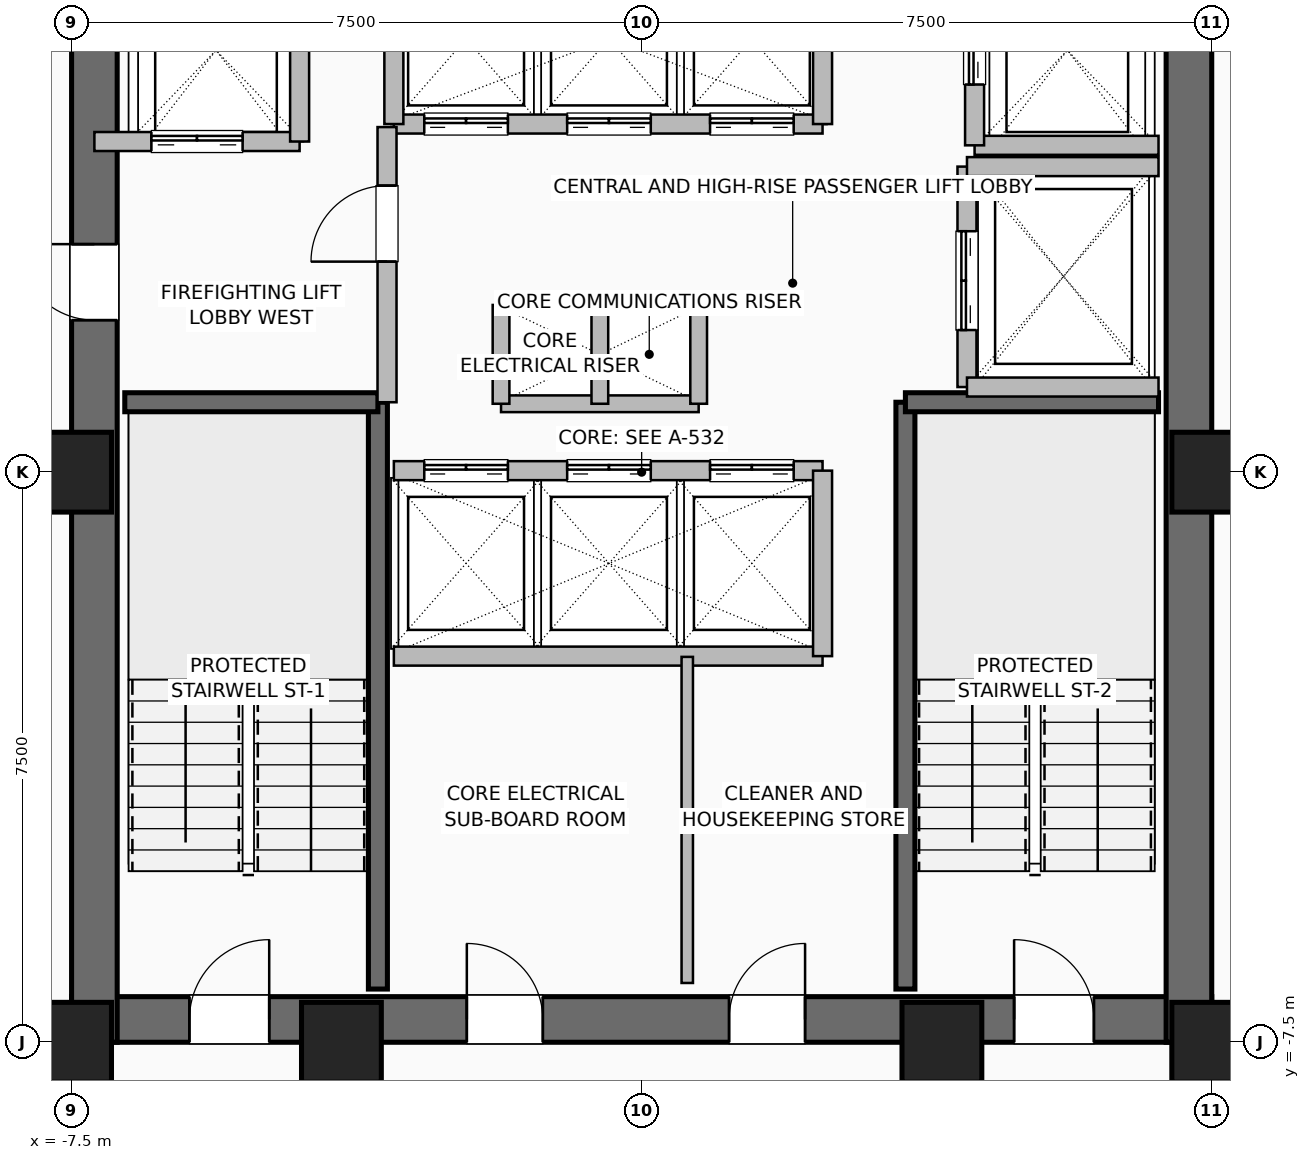
"""IFC4 building model, lengths in metres.
Left out: names, types, materials, properties, quantities, classifications, styles, units other than length and angle.
Written with IfcOpenShell. Run it as: python <this file> out.ifc"""

import sys

from ifc_helpers import new_model, si_unit, direction, frame, frame_2d, origin, origin_2d, place, context, subcontext, project, spatial, rectangle, hollow_rectangle, extrude, element, fill, save


model = new_model("IFC4")
c1 = context("Model", 3, precision=1e-05, world=origin(), true_north=direction((0.0, 1.0)))
c2 = subcontext(c1, "Body", "Model", "MODEL_VIEW")
j1 = project(units=[si_unit("LENGTHUNIT", "METRE"), si_unit("PLANEANGLEUNIT", "RADIAN")], contexts=[c1])
p1 = place(None, origin())
s1 = spatial("IfcSite", under=j1, at=p1, CompositionType="ELEMENT")
p2 = place(p1, origin())
s2 = spatial("IfcBuilding", under=s1, at=p2, CompositionType="ELEMENT")
p3 = place(p2, frame((0.0, 0.0, 122.8)))
s3 = spatial("IfcBuildingStorey", under=s2, at=p3, CompositionType="ELEMENT", Elevation=122.8)
for number, where, z_axis, x_axis in (
    (1, (-7.5, -7.5, 0.0), (0.0, 0.0, 1.0), (1.0, 0.0, 0.0)),
    (2, (-3.95, -7.5, 0.0), (0.0, 0.0, 1.0), (1.0, 0.0, 0.0)),
    (3, (3.95, -7.5, 0.0), (0.0, 0.0, 1.0), (1.0, 0.0, 0.0)),
    (4, (7.5, -7.5, 0.0), (0.0, 0.0, 1.0), (1.0, 0.0, 0.0)),
    (5, (7.5, 0.0, 0.0), (0.0, 0.0, 1.0), (1.0, 0.0, 0.0)),
    (6, (-7.5, 0.0, 0.0), (0.0, 0.0, 1.0), (1.0, 0.0, 0.0)),
):
    element("IfcColumn", number, at=place(p3, frame(where, z_axis=z_axis, x_axis=x_axis)), inside=s3, PredefinedType="COLUMN", context=c2, shape_type="SweptSolid", body=[
        extrude(hollow_rectangle(XDim=1.05, YDim=1.05, WallThickness=0.05, at=origin_2d()), origin(), (0.0, 0.0, 1.0), 3.6),
    ])
p4 = place(p3, frame((-7.5, -7.2, 0.0), z_axis=(0.0, 0.0, 1.0), x_axis=(1.0, 0.0, 0.0)))
e7 = element("IfcWall", 7, at=p4, inside=s3, PredefinedType="SHEAR", context=c2, shape_type="SweptSolid", body=[
    extrude(rectangle(XDim=15.0, YDim=0.6, at=frame_2d((7.5, 0.0))), origin(), (0.0, 0.0, 1.0), 3.36),
])
p5 = place(p4, frame((1.55, 0.0, 0.0)))
e8 = element("IfcOpeningElement", 8, at=p5, cuts=e7, PredefinedType="OPENING", context=c2, shape_type="SweptSolid", body=[
    extrude(rectangle(XDim=1.05, YDim=2.08, at=frame_2d((0.525, 1.04))), frame((0.0, 0.31, 0.0), z_axis=(0.0, -1.0, 0.0), x_axis=(1.0, 0.0, 0.0)), (0.0, 0.0, 1.0), 0.62),
])
p6 = place(p4, frame((12.4, 0.0, 0.0)))
e9 = element("IfcOpeningElement", 9, at=p6, cuts=e7, PredefinedType="OPENING", context=c2, shape_type="SweptSolid", body=[
    extrude(rectangle(XDim=1.05, YDim=2.08, at=frame_2d((0.525, 1.04))), frame((0.0, 0.31, 0.0), z_axis=(0.0, -1.0, 0.0), x_axis=(1.0, 0.0, 0.0)), (0.0, 0.0, 1.0), 0.62),
])
p7 = place(p4, frame((5.2, 0.0, 0.0)))
e10 = element("IfcOpeningElement", 10, at=p7, cuts=e7, PredefinedType="OPENING", context=c2, shape_type="SweptSolid", body=[
    extrude(rectangle(XDim=1.0, YDim=2.08, at=frame_2d((0.5, 1.04))), frame((0.0, 0.31, 0.0), z_axis=(0.0, -1.0, 0.0), x_axis=(1.0, 0.0, 0.0)), (0.0, 0.0, 1.0), 0.62),
])
p8 = place(p4, frame((8.65, 0.0, 0.0)))
e11 = element("IfcOpeningElement", 11, at=p8, cuts=e7, PredefinedType="OPENING", context=c2, shape_type="SweptSolid", body=[
    extrude(rectangle(XDim=1.0, YDim=2.08, at=frame_2d((0.5, 1.04))), frame((0.0, 0.31, 0.0), z_axis=(0.0, -1.0, 0.0), x_axis=(1.0, 0.0, 0.0)), (0.0, 0.0, 1.0), 0.62),
])
p9 = place(p3, frame((-7.2, -7.5, 0.0), z_axis=(0.0, 0.0, 1.0), x_axis=(0.0, 1.0, 0.0)))
e12 = element("IfcWall", 12, at=p9, inside=s3, PredefinedType="SHEAR", context=c2, shape_type="SweptSolid", body=[
    extrude(rectangle(XDim=15.0, YDim=0.6, at=frame_2d((7.5, 0.0))), origin(), (0.0, 0.0, 1.0), 3.36),
])
p10 = place(p9, frame((9.5, 0.0, 0.0)))
e13 = element("IfcOpeningElement", 13, at=p10, cuts=e12, PredefinedType="OPENING", context=c2, shape_type="SweptSolid", body=[
    extrude(rectangle(XDim=1.0, YDim=2.08, at=frame_2d((0.5, 1.04))), frame((0.0, 0.31, 0.0), z_axis=(0.0, -1.0, 0.0), x_axis=(1.0, 0.0, 0.0)), (0.0, 0.0, 1.0), 0.62),
])
p11 = place(p3, frame((7.2, -7.5, 0.0), z_axis=(0.0, 0.0, 1.0), x_axis=(0.0, 1.0, 0.0)))
e14 = element("IfcWall", 14, at=p11, inside=s3, PredefinedType="SHEAR", context=c2, shape_type="SweptSolid", body=[
    extrude(rectangle(XDim=15.0, YDim=0.6, at=frame_2d((7.5, 0.0))), origin(), (0.0, 0.0, 1.0), 3.36),
])
p12 = place(p3, frame((-3.47, -6.8, 0.0), z_axis=(0.0, 0.0, 1.0), x_axis=(0.0, 1.0, 0.0)))
e15 = element("IfcWall", 15, at=p12, inside=s3, PredefinedType="SHEAR", context=c2, shape_type="SweptSolid", body=[
    extrude(rectangle(XDim=7.72, YDim=0.25, at=frame_2d((3.86, 0.0))), origin(), (0.0, 0.0, 1.0), 3.36),
])
p13 = place(p3, frame((-6.8, 0.92, 0.0), z_axis=(0.0, 0.0, 1.0), x_axis=(1.0, 0.0, 0.0)))
e16 = element("IfcWall", 16, at=p13, inside=s3, PredefinedType="SHEAR", context=c2, shape_type="SweptSolid", body=[
    extrude(rectangle(XDim=3.33, YDim=0.25, at=frame_2d((1.665, 0.0))), origin(), (0.0, 0.0, 1.0), 3.36),
])
p14 = place(p3, frame((3.47, -6.8, 0.0), z_axis=(0.0, 0.0, 1.0), x_axis=(0.0, 1.0, 0.0)))
e17 = element("IfcWall", 17, at=p14, inside=s3, PredefinedType="SHEAR", context=c2, shape_type="SweptSolid", body=[
    extrude(rectangle(XDim=7.72, YDim=0.25, at=frame_2d((3.86, 0.0))), origin(), (0.0, 0.0, 1.0), 3.36),
])
p15 = place(p3, frame((3.47, 0.92, 0.0), z_axis=(0.0, 0.0, 1.0), x_axis=(1.0, 0.0, 0.0)))
e18 = element("IfcWall", 18, at=p15, inside=s3, PredefinedType="SHEAR", context=c2, shape_type="SweptSolid", body=[
    extrude(rectangle(XDim=3.33, YDim=0.25, at=frame_2d((1.665, 0.0))), origin(), (0.0, 0.0, 1.0), 3.36),
])
for number, where, z_axis, x_axis in (
    (19, (-1.85, 2.2, 0.0), (0.0, 0.0, 1.0), (1.0, 0.0, 0.0)),
    (20, (-1.85, 0.9, 0.0), (0.0, 0.0, 1.0), (1.0, 0.0, 0.0)),
):
    element("IfcWall", number, at=place(p3, frame(where, z_axis=z_axis, x_axis=x_axis)), inside=s3, PredefinedType="PARTITIONING", context=c2, shape_type="SweptSolid", body=[
        extrude(rectangle(XDim=2.6, YDim=0.22, at=frame_2d((1.3, 0.0))), origin(), (0.0, 0.0, 1.0), 3.36),
    ])
for number, where, z_axis, x_axis in (
    (21, (-0.55, 0.9, 0.0), (0.0, 0.0, 1.0), (0.0, 1.0, 0.0)),
    (22, (0.75, 0.9, 0.0), (0.0, 0.0, 1.0), (0.0, 1.0, 0.0)),
    (23, (-1.85, 0.9, 0.0), (0.0, 0.0, 1.0), (0.0, 1.0, 0.0)),
):
    element("IfcWall", number, at=place(p3, frame(where, z_axis=z_axis, x_axis=x_axis)), inside=s3, PredefinedType="PARTITIONING", context=c2, shape_type="SweptSolid", body=[
        extrude(rectangle(XDim=1.3, YDim=0.22, at=frame_2d((0.65, 0.0))), origin(), (0.0, 0.0, 1.0), 3.36),
    ])
p16 = place(p3, frame((-3.26, 0.02, 0.0), z_axis=(0.0, 0.0, 1.0), x_axis=(1.0, 0.0, 0.0)))
e24 = element("IfcWall", 24, at=p16, inside=s3, PredefinedType="SHEAR", context=c2, shape_type="SweptSolid", body=[
    extrude(rectangle(XDim=5.64, YDim=0.25, at=frame_2d((2.82, 0.0))), origin(), (0.0, 0.0, 1.0), 3.36),
])
p17 = place(p16, frame((0.4, 0.0, 0.0)))
e25 = element("IfcOpeningElement", 25, at=p17, cuts=e24, PredefinedType="OPENING", context=c2, shape_type="SweptSolid", body=[
    extrude(rectangle(XDim=1.1, YDim=2.2, at=frame_2d((0.55, 1.1))), frame((0.0, 0.135, 0.0), z_axis=(0.0, -1.0, 0.0), x_axis=(1.0, 0.0, 0.0)), (0.0, 0.0, 1.0), 0.27),
])
p18 = place(p16, frame((2.28, 0.0, 0.0)))
e26 = element("IfcOpeningElement", 26, at=p18, cuts=e24, PredefinedType="OPENING", context=c2, shape_type="SweptSolid", body=[
    extrude(rectangle(XDim=1.1, YDim=2.2, at=frame_2d((0.55, 1.1))), frame((0.0, 0.135, 0.0), z_axis=(0.0, -1.0, 0.0), x_axis=(1.0, 0.0, 0.0)), (0.0, 0.0, 1.0), 0.27),
])
p19 = place(p16, frame((4.16, 0.0, 0.0)))
e27 = element("IfcOpeningElement", 27, at=p19, cuts=e24, PredefinedType="OPENING", context=c2, shape_type="SweptSolid", body=[
    extrude(rectangle(XDim=1.1, YDim=2.2, at=frame_2d((0.55, 1.1))), frame((0.0, 0.135, 0.0), z_axis=(0.0, -1.0, 0.0), x_axis=(1.0, 0.0, 0.0)), (0.0, 0.0, 1.0), 0.27),
])
p20 = place(p3, frame((-3.26, -2.42, 0.0), z_axis=(0.0, 0.0, 1.0), x_axis=(1.0, 0.0, 0.0)))
e28 = element("IfcWall", 28, at=p20, inside=s3, PredefinedType="SHEAR", context=c2, shape_type="SweptSolid", body=[
    extrude(rectangle(XDim=5.64, YDim=0.25, at=frame_2d((2.82, 0.0))), origin(), (0.0, 0.0, 1.0), 3.36),
])
p21 = place(p3, frame((2.38, -2.42, 0.0), z_axis=(0.0, 0.0, 1.0), x_axis=(0.0, 1.0, 0.0)))
e29 = element("IfcWall", 29, at=p21, inside=s3, PredefinedType="SHEAR", context=c2, shape_type="SweptSolid", body=[
    extrude(rectangle(XDim=2.44, YDim=0.25, at=frame_2d((1.22, 0.0))), origin(), (0.0, 0.0, 1.0), 3.36),
])
p22 = place(p3, frame((-3.26, 4.58, 0.0), z_axis=(0.0, 0.0, 1.0), x_axis=(1.0, 0.0, 0.0)))
e30 = element("IfcWall", 30, at=p22, inside=s3, PredefinedType="SHEAR", context=c2, shape_type="SweptSolid", body=[
    extrude(rectangle(XDim=5.64, YDim=0.25, at=frame_2d((2.82, 0.0))), origin(), (0.0, 0.0, 1.0), 3.36),
])
p23 = place(p22, frame((0.4, 0.0, 0.0)))
e31 = element("IfcOpeningElement", 31, at=p23, cuts=e30, PredefinedType="OPENING", context=c2, shape_type="SweptSolid", body=[
    extrude(rectangle(XDim=1.1, YDim=2.2, at=frame_2d((0.55, 1.1))), frame((0.0, 0.135, 0.0), z_axis=(0.0, -1.0, 0.0), x_axis=(1.0, 0.0, 0.0)), (0.0, 0.0, 1.0), 0.27),
])
p24 = place(p22, frame((2.28, 0.0, 0.0)))
e32 = element("IfcOpeningElement", 32, at=p24, cuts=e30, PredefinedType="OPENING", context=c2, shape_type="SweptSolid", body=[
    extrude(rectangle(XDim=1.1, YDim=2.2, at=frame_2d((0.55, 1.1))), frame((0.0, 0.135, 0.0), z_axis=(0.0, -1.0, 0.0), x_axis=(1.0, 0.0, 0.0)), (0.0, 0.0, 1.0), 0.27),
])
p25 = place(p22, frame((4.16, 0.0, 0.0)))
e33 = element("IfcOpeningElement", 33, at=p25, cuts=e30, PredefinedType="OPENING", context=c2, shape_type="SweptSolid", body=[
    extrude(rectangle(XDim=1.1, YDim=2.2, at=frame_2d((0.55, 1.1))), frame((0.0, 0.135, 0.0), z_axis=(0.0, -1.0, 0.0), x_axis=(1.0, 0.0, 0.0)), (0.0, 0.0, 1.0), 0.27),
])
for number, where, z_axis, x_axis in (
    (34, (-3.26, 4.58, 0.0), (0.0, 0.0, 1.0), (0.0, 1.0, 0.0)),
    (35, (2.38, 4.58, 0.0), (0.0, 0.0, 1.0), (0.0, 1.0, 0.0)),
):
    element("IfcWall", number, at=place(p3, frame(where, z_axis=z_axis, x_axis=x_axis)), inside=s3, PredefinedType="SHEAR", context=c2, shape_type="SweptSolid", body=[
        extrude(rectangle(XDim=2.22, YDim=0.25, at=frame_2d((1.11, 0.0))), origin(), (0.0, 0.0, 1.0), 3.36),
    ])
p26 = place(p3, frame((-7.2, 4.35, 0.0), z_axis=(0.0, 0.0, 1.0), x_axis=(1.0, 0.0, 0.0)))
e36 = element("IfcWall", 36, at=p26, inside=s3, PredefinedType="SHEAR", context=c2, shape_type="SweptSolid", body=[
    extrude(rectangle(XDim=2.7, YDim=0.25, at=frame_2d((1.35, 0.0))), origin(), (0.0, 0.0, 1.0), 3.36),
])
p27 = place(p26, frame((0.75, 0.0, 0.0)))
e37 = element("IfcOpeningElement", 37, at=p27, cuts=e36, PredefinedType="OPENING", context=c2, shape_type="SweptSolid", body=[
    extrude(rectangle(XDim=1.2, YDim=2.2, at=frame_2d((0.6, 1.1))), frame((0.0, 0.135, 0.0), z_axis=(0.0, -1.0, 0.0), x_axis=(1.0, 0.0, 0.0)), (0.0, 0.0, 1.0), 0.27),
])
p28 = place(p3, frame((-4.5, 4.35, 0.0), z_axis=(0.0, 0.0, 1.0), x_axis=(0.0, 1.0, 0.0)))
e38 = element("IfcWall", 38, at=p28, inside=s3, PredefinedType="SHEAR", context=c2, shape_type="SweptSolid", body=[
    extrude(rectangle(XDim=2.85, YDim=0.25, at=frame_2d((1.425, 0.0))), origin(), (0.0, 0.0, 1.0), 3.36),
])
p29 = place(p3, frame((4.38, 4.3, 0.0), z_axis=(0.0, 0.0, 1.0), x_axis=(1.0, 0.0, 0.0)))
e39 = element("IfcWall", 39, at=p29, inside=s3, PredefinedType="SHEAR", context=c2, shape_type="SweptSolid", body=[
    extrude(rectangle(XDim=2.42, YDim=0.25, at=frame_2d((1.21, 0.0))), origin(), (0.0, 0.0, 1.0), 3.36),
])
p30 = place(p3, frame((4.38, 4.3, 0.0), z_axis=(0.0, 0.0, 1.0), x_axis=(0.0, 1.0, 0.0)))
e40 = element("IfcWall", 40, at=p30, inside=s3, PredefinedType="SHEAR", context=c2, shape_type="SweptSolid", body=[
    extrude(rectangle(XDim=2.5, YDim=0.25, at=frame_2d((1.25, 0.0))), origin(), (0.0, 0.0, 1.0), 3.36),
])
p31 = place(p30, frame((0.8, 0.0, 0.0)))
e41 = element("IfcOpeningElement", 41, at=p31, cuts=e40, PredefinedType="OPENING", context=c2, shape_type="SweptSolid", body=[
    extrude(rectangle(XDim=1.2, YDim=2.2, at=frame_2d((0.6, 1.1))), frame((0.0, 0.135, 0.0), z_axis=(0.0, -1.0, 0.0), x_axis=(1.0, 0.0, 0.0)), (0.0, 0.0, 1.0), 0.27),
])
p32 = place(p3, frame((4.28, 1.12, 0.0), z_axis=(0.0, 0.0, 1.0), x_axis=(0.0, 1.0, 0.0)))
e42 = element("IfcWall", 42, at=p32, inside=s3, PredefinedType="SHEAR", context=c2, shape_type="SweptSolid", body=[
    extrude(rectangle(XDim=2.9, YDim=0.25, at=frame_2d((1.45, 0.0))), origin(), (0.0, 0.0, 1.0), 3.36),
])
p33 = place(p32, frame((0.75, 0.0, 0.0)))
e43 = element("IfcOpeningElement", 43, at=p33, cuts=e42, PredefinedType="OPENING", context=c2, shape_type="SweptSolid", body=[
    extrude(rectangle(XDim=1.3, YDim=2.3, at=frame_2d((0.65, 1.15))), frame((0.0, 0.135, 0.0), z_axis=(0.0, -1.0, 0.0), x_axis=(1.0, 0.0, 0.0)), (0.0, 0.0, 1.0), 0.27),
])
for number, where, z_axis, x_axis in (
    (44, (4.28, 1.12, 0.0), (0.0, 0.0, 1.0), (1.0, 0.0, 0.0)),
    (45, (4.28, 4.02, 0.0), (0.0, 0.0, 1.0), (1.0, 0.0, 0.0)),
):
    element("IfcWall", number, at=place(p3, frame(where, z_axis=z_axis, x_axis=x_axis)), inside=s3, PredefinedType="SHEAR", context=c2, shape_type="SweptSolid", body=[
        extrude(rectangle(XDim=2.52, YDim=0.25, at=frame_2d((1.26, 0.0))), origin(), (0.0, 0.0, 1.0), 3.36),
    ])
p34 = place(p3, frame((-3.35, 0.92, 0.0), z_axis=(0.0, 0.0, 1.0), x_axis=(0.0, 1.0, 0.0)))
e46 = element("IfcWall", 46, at=p34, inside=s3, PredefinedType="SHEAR", context=c2, shape_type="SweptSolid", body=[
    extrude(rectangle(XDim=3.62, YDim=0.25, at=frame_2d((1.81, 0.0))), origin(), (0.0, 0.0, 1.0), 3.36),
])
p35 = place(p34, frame((1.85, 0.0, 0.0)))
e47 = element("IfcOpeningElement", 47, at=p35, cuts=e46, PredefinedType="OPENING", context=c2, shape_type="SweptSolid", body=[
    extrude(rectangle(XDim=1.0, YDim=2.08, at=frame_2d((0.5, 1.04))), frame((0.0, 0.135, 0.0), z_axis=(0.0, -1.0, 0.0), x_axis=(1.0, 0.0, 0.0)), (0.0, 0.0, 1.0), 0.27),
])
p36 = place(p3, frame((0.6, -6.72, 0.0), z_axis=(0.0, 0.0, 1.0), x_axis=(0.0, 1.0, 0.0)))
e48 = element("IfcWall", 48, at=p36, inside=s3, PredefinedType="PARTITIONING", context=c2, shape_type="SweptSolid", body=[
    extrude(rectangle(XDim=4.29, YDim=0.15, at=frame_2d((2.145, 0.0))), origin(), (0.0, 0.0, 1.0), 3.36),
])
p37 = place(p3, frame((7.45, -7.48, 0.0), z_axis=(0.0, 0.0, 1.0), x_axis=(1.0, 0.0, 0.0)))
e49 = element("IfcWall", 49, at=p37, inside=s3, PredefinedType="PARTITIONING", context=c2, shape_type="SweptSolid", body=[
    extrude(rectangle(XDim=0.95, YDim=0.15, at=frame_2d((0.475, 0.0))), origin(), (0.0, 0.0, 1.0), 3.36),
])
p38 = place(p5, origin())
e50 = element("IfcDoor", 50, at=p38, inside=s3, OperationType="SINGLE_SWING_RIGHT", PredefinedType="DOOR", context=c2, shape_type="SweptSolid", body=[
    extrude(rectangle(XDim=1.05, YDim=2.08, at=frame_2d((0.525, 1.04))), frame((0.0, 0.025, 0.0), z_axis=(0.0, -1.0, 0.0), x_axis=(1.0, 0.0, 0.0)), (0.0, 0.0, 1.0), 0.05),
])
fill(e8, e50)
p39 = place(p6, origin())
e51 = element("IfcDoor", 51, at=p39, inside=s3, OperationType="SINGLE_SWING_LEFT", PredefinedType="DOOR", context=c2, shape_type="SweptSolid", body=[
    extrude(rectangle(XDim=1.05, YDim=2.08, at=frame_2d((0.525, 1.04))), frame((0.0, 0.025, 0.0), z_axis=(0.0, -1.0, 0.0), x_axis=(1.0, 0.0, 0.0)), (0.0, 0.0, 1.0), 0.05),
])
fill(e9, e51)
p40 = place(p10, origin())
e52 = element("IfcDoor", 52, at=p40, inside=s3, OperationType="SINGLE_SWING_RIGHT", PredefinedType="DOOR", context=c2, shape_type="SweptSolid", body=[
    extrude(rectangle(XDim=1.0, YDim=2.08, at=frame_2d((0.5, 1.04))), frame((0.0, 0.025, 0.0), z_axis=(0.0, -1.0, 0.0), x_axis=(1.0, 0.0, 0.0)), (0.0, 0.0, 1.0), 0.05),
])
fill(e13, e52)
p41 = place(p7, origin())
e53 = element("IfcDoor", 53, at=p41, inside=s3, OperationType="SINGLE_SWING_LEFT", PredefinedType="DOOR", context=c2, shape_type="SweptSolid", body=[
    extrude(rectangle(XDim=1.0, YDim=2.08, at=frame_2d((0.5, 1.04))), frame((0.0, 0.025, 0.0), z_axis=(0.0, -1.0, 0.0), x_axis=(1.0, 0.0, 0.0)), (0.0, 0.0, 1.0), 0.05),
])
fill(e10, e53)
p42 = place(p8, origin())
e54 = element("IfcDoor", 54, at=p42, inside=s3, OperationType="SINGLE_SWING_RIGHT", PredefinedType="DOOR", context=c2, shape_type="SweptSolid", body=[
    extrude(rectangle(XDim=1.0, YDim=2.08, at=frame_2d((0.5, 1.04))), frame((0.0, 0.025, 0.0), z_axis=(0.0, -1.0, 0.0), x_axis=(1.0, 0.0, 0.0)), (0.0, 0.0, 1.0), 0.05),
])
fill(e11, e54)
p43 = place(p17, origin())
e55 = element("IfcDoor", 55, at=p43, inside=s3, OperationType="DOUBLE_DOOR_SLIDING", PredefinedType="DOOR", context=c2, shape_type="SweptSolid", body=[
    extrude(rectangle(XDim=1.1, YDim=2.2, at=frame_2d((0.55, 1.1))), frame((0.0, 0.025, 0.0), z_axis=(0.0, -1.0, 0.0), x_axis=(1.0, 0.0, 0.0)), (0.0, 0.0, 1.0), 0.05),
])
fill(e25, e55)
p44 = place(p18, origin())
e56 = element("IfcDoor", 56, at=p44, inside=s3, OperationType="DOUBLE_DOOR_SLIDING", PredefinedType="DOOR", context=c2, shape_type="SweptSolid", body=[
    extrude(rectangle(XDim=1.1, YDim=2.2, at=frame_2d((0.55, 1.1))), frame((0.0, 0.025, 0.0), z_axis=(0.0, -1.0, 0.0), x_axis=(1.0, 0.0, 0.0)), (0.0, 0.0, 1.0), 0.05),
])
fill(e26, e56)
p45 = place(p19, origin())
e57 = element("IfcDoor", 57, at=p45, inside=s3, OperationType="DOUBLE_DOOR_SLIDING", PredefinedType="DOOR", context=c2, shape_type="SweptSolid", body=[
    extrude(rectangle(XDim=1.1, YDim=2.2, at=frame_2d((0.55, 1.1))), frame((0.0, 0.025, 0.0), z_axis=(0.0, -1.0, 0.0), x_axis=(1.0, 0.0, 0.0)), (0.0, 0.0, 1.0), 0.05),
])
fill(e27, e57)
p46 = place(p23, origin())
e58 = element("IfcDoor", 58, at=p46, inside=s3, OperationType="DOUBLE_DOOR_SLIDING", PredefinedType="DOOR", context=c2, shape_type="SweptSolid", body=[
    extrude(rectangle(XDim=1.1, YDim=2.2, at=frame_2d((0.55, 1.1))), frame((0.0, 0.025, 0.0), z_axis=(0.0, -1.0, 0.0), x_axis=(1.0, 0.0, 0.0)), (0.0, 0.0, 1.0), 0.05),
])
fill(e31, e58)
p47 = place(p24, origin())
e59 = element("IfcDoor", 59, at=p47, inside=s3, OperationType="DOUBLE_DOOR_SLIDING", PredefinedType="DOOR", context=c2, shape_type="SweptSolid", body=[
    extrude(rectangle(XDim=1.1, YDim=2.2, at=frame_2d((0.55, 1.1))), frame((0.0, 0.025, 0.0), z_axis=(0.0, -1.0, 0.0), x_axis=(1.0, 0.0, 0.0)), (0.0, 0.0, 1.0), 0.05),
])
fill(e32, e59)
p48 = place(p25, origin())
e60 = element("IfcDoor", 60, at=p48, inside=s3, OperationType="DOUBLE_DOOR_SLIDING", PredefinedType="DOOR", context=c2, shape_type="SweptSolid", body=[
    extrude(rectangle(XDim=1.1, YDim=2.2, at=frame_2d((0.55, 1.1))), frame((0.0, 0.025, 0.0), z_axis=(0.0, -1.0, 0.0), x_axis=(1.0, 0.0, 0.0)), (0.0, 0.0, 1.0), 0.05),
])
fill(e33, e60)
p49 = place(p27, origin())
e61 = element("IfcDoor", 61, at=p49, inside=s3, OperationType="DOUBLE_DOOR_SLIDING", PredefinedType="DOOR", context=c2, shape_type="SweptSolid", body=[
    extrude(rectangle(XDim=1.2, YDim=2.2, at=frame_2d((0.6, 1.1))), frame((0.0, 0.025, 0.0), z_axis=(0.0, -1.0, 0.0), x_axis=(1.0, 0.0, 0.0)), (0.0, 0.0, 1.0), 0.05),
])
fill(e37, e61)
p50 = place(p31, origin())
e62 = element("IfcDoor", 62, at=p50, inside=s3, OperationType="DOUBLE_DOOR_SLIDING", PredefinedType="DOOR", context=c2, shape_type="SweptSolid", body=[
    extrude(rectangle(XDim=1.2, YDim=2.2, at=frame_2d((0.6, 1.1))), frame((0.0, 0.025, 0.0), z_axis=(0.0, -1.0, 0.0), x_axis=(1.0, 0.0, 0.0)), (0.0, 0.0, 1.0), 0.05),
])
fill(e41, e62)
p51 = place(p33, origin())
e63 = element("IfcDoor", 63, at=p51, inside=s3, OperationType="DOUBLE_DOOR_SLIDING", PredefinedType="DOOR", context=c2, shape_type="SweptSolid", body=[
    extrude(rectangle(XDim=1.3, YDim=2.3, at=frame_2d((0.65, 1.15))), frame((0.0, 0.025, 0.0), z_axis=(0.0, -1.0, 0.0), x_axis=(1.0, 0.0, 0.0)), (0.0, 0.0, 1.0), 0.05),
])
fill(e43, e63)
p52 = place(p35, origin())
e64 = element("IfcDoor", 64, at=p52, inside=s3, OperationType="SINGLE_SWING_LEFT", PredefinedType="DOOR", context=c2, shape_type="SweptSolid", body=[
    extrude(rectangle(XDim=1.0, YDim=2.08, at=frame_2d((0.5, 1.04))), frame((0.0, 0.025, 0.0), z_axis=(0.0, -1.0, 0.0), x_axis=(1.0, 0.0, 0.0)), (0.0, 0.0, 1.0), 0.05),
])
fill(e47, e64)
save(model, sys.argv[1])
